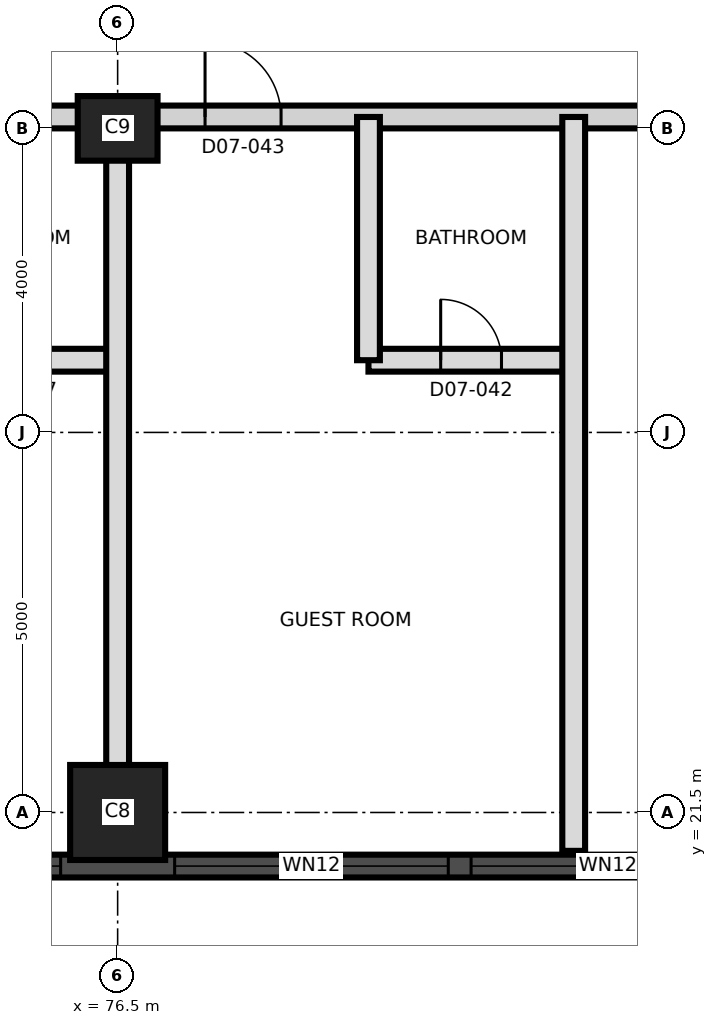
"""IFC4 building model, lengths in metres.
Left out: names, types, materials, properties, quantities, classifications, styles, units other than length and angle.
Written with IfcOpenShell. Run it as: python <this file> out.ifc"""

import sys

from ifc_helpers import new_model, si_unit, direction, frame, frame_2d, origin, origin_2d, place, context, subcontext, project, spatial, rectangle, extrude, element, fill, save


model = new_model("IFC4")
c1 = context("Model", 3, precision=1e-05, world=origin(), true_north=direction((0.0, 1.0)))
c2 = subcontext(c1, "Body", "Model", "MODEL_VIEW")
j1 = project(units=[si_unit("LENGTHUNIT", "METRE"), si_unit("PLANEANGLEUNIT", "RADIAN")], contexts=[c1])
p1 = place(None, origin())
s1 = spatial("IfcSite", under=j1, at=p1, CompositionType="ELEMENT")
p2 = place(p1, origin())
s2 = spatial("IfcBuilding", under=s1, at=p2, CompositionType="ELEMENT")
p3 = place(p2, frame((0.0, 0.0, 90.8)))
s3 = spatial("IfcBuildingStorey", under=s2, at=p3, CompositionType="ELEMENT", Elevation=90.8)
p4 = place(p3, frame((76.5, 21.5, 0.0), z_axis=(0.0, 0.0, 1.0), x_axis=(1.0, 0.0, 0.0)))
e1 = element("IfcColumn", 1, at=p4, inside=s3, PredefinedType="COLUMN", context=c2, shape_type="SweptSolid", body=[
    extrude(rectangle(XDim=1.25, YDim=1.25, at=origin_2d()), origin(), (0.0, 0.0, 1.0), 3.7),
])
p5 = place(p3, frame((76.5, 30.5, 0.0), z_axis=(0.0, 0.0, 1.0), x_axis=(1.0, 0.0, 0.0)))
e2 = element("IfcColumn", 2, at=p5, inside=s3, PredefinedType="COLUMN", context=c2, shape_type="SweptSolid", body=[
    extrude(rectangle(XDim=1.05, YDim=0.85, at=origin_2d()), origin(), (0.0, 0.0, 1.0), 3.7),
])
p6 = place(p3, frame((44.011, 20.795, 0.0), z_axis=(0.0, 0.0, 1.0), x_axis=(1.0, 0.0, 0.0)))
e3 = element("IfcWall", 3, at=p6, inside=s3, PredefinedType="SOLIDWALL", context=c2, shape_type="SweptSolid", body=[
    extrude(rectangle(XDim=43.476, YDim=0.3, at=frame_2d((21.738, 0.0))), origin(), (0.0, 0.0, 1.0), 3.4),
])
p7 = place(p6, frame((1.845, 0.0, 0.3)))
e4 = element("IfcOpeningElement", 4, at=p7, cuts=e3, PredefinedType="OPENING", context=c2, shape_type="SweptSolid", body=[
    extrude(rectangle(XDim=1.8, YDim=2.4, at=frame_2d((0.9, 1.2))), frame((0.0, 0.16, 0.0), z_axis=(0.0, -1.0, 0.0), x_axis=(1.0, 0.0, 0.0)), (0.0, 0.0, 1.0), 0.32),
])
p8 = place(p6, frame((5.639, 0.0, 0.9)))
e5 = element("IfcOpeningElement", 5, at=p8, cuts=e3, PredefinedType="OPENING", context=c2, shape_type="SweptSolid", body=[
    extrude(rectangle(XDim=4.2, YDim=1.5, at=frame_2d((2.1, 0.75))), frame((0.0, 0.16, 0.0), z_axis=(0.0, -1.0, 0.0), x_axis=(1.0, 0.0, 0.0)), (0.0, 0.0, 1.0), 0.32),
])
p9 = place(p6, frame((10.139, 0.0, 0.9)))
e6 = element("IfcOpeningElement", 6, at=p9, cuts=e3, PredefinedType="OPENING", context=c2, shape_type="SweptSolid", body=[
    extrude(rectangle(XDim=4.2, YDim=1.5, at=frame_2d((2.1, 0.75))), frame((0.0, 0.16, 0.0), z_axis=(0.0, -1.0, 0.0), x_axis=(1.0, 0.0, 0.0)), (0.0, 0.0, 1.0), 0.32),
])
p10 = place(p6, frame((14.639, 0.0, 0.9)))
e7 = element("IfcOpeningElement", 7, at=p10, cuts=e3, PredefinedType="OPENING", context=c2, shape_type="SweptSolid", body=[
    extrude(rectangle(XDim=4.2, YDim=1.5, at=frame_2d((2.1, 0.75))), frame((0.0, 0.16, 0.0), z_axis=(0.0, -1.0, 0.0), x_axis=(1.0, 0.0, 0.0)), (0.0, 0.0, 1.0), 0.32),
])
p11 = place(p6, frame((19.139, 0.0, 0.9)))
e8 = element("IfcOpeningElement", 8, at=p11, cuts=e3, PredefinedType="OPENING", context=c2, shape_type="SweptSolid", body=[
    extrude(rectangle(XDim=3.6, YDim=1.5, at=frame_2d((1.8, 0.75))), frame((0.0, 0.16, 0.0), z_axis=(0.0, -1.0, 0.0), x_axis=(1.0, 0.0, 0.0)), (0.0, 0.0, 1.0), 0.32),
])
p12 = place(p6, frame((24.239, 0.0, 0.9)))
e9 = element("IfcOpeningElement", 9, at=p12, cuts=e3, PredefinedType="OPENING", context=c2, shape_type="SweptSolid", body=[
    extrude(rectangle(XDim=3.6, YDim=1.5, at=frame_2d((1.8, 0.75))), frame((0.0, 0.16, 0.0), z_axis=(0.0, -1.0, 0.0), x_axis=(1.0, 0.0, 0.0)), (0.0, 0.0, 1.0), 0.32),
])
p13 = place(p6, frame((28.139, 0.0, 0.9)))
e10 = element("IfcOpeningElement", 10, at=p13, cuts=e3, PredefinedType="OPENING", context=c2, shape_type="SweptSolid", body=[
    extrude(rectangle(XDim=3.6, YDim=1.5, at=frame_2d((1.8, 0.75))), frame((0.0, 0.16, 0.0), z_axis=(0.0, -1.0, 0.0), x_axis=(1.0, 0.0, 0.0)), (0.0, 0.0, 1.0), 0.32),
])
p14 = place(p6, frame((33.239, 0.0, 0.9)))
e11 = element("IfcOpeningElement", 11, at=p14, cuts=e3, PredefinedType="OPENING", context=c2, shape_type="SweptSolid", body=[
    extrude(rectangle(XDim=3.6, YDim=1.5, at=frame_2d((1.8, 0.75))), frame((0.0, 0.16, 0.0), z_axis=(0.0, -1.0, 0.0), x_axis=(1.0, 0.0, 0.0)), (0.0, 0.0, 1.0), 0.32),
])
p15 = place(p6, frame((37.139, 0.0, 0.9)))
e12 = element("IfcOpeningElement", 12, at=p15, cuts=e3, PredefinedType="OPENING", context=c2, shape_type="SweptSolid", body=[
    extrude(rectangle(XDim=3.6, YDim=1.5, at=frame_2d((1.8, 0.75))), frame((0.0, 0.16, 0.0), z_axis=(0.0, -1.0, 0.0), x_axis=(1.0, 0.0, 0.0)), (0.0, 0.0, 1.0), 0.32),
])
p16 = place(p3, frame((73.8, 27.45, 0.0), z_axis=(0.0, 0.0, 1.0), x_axis=(1.0, 0.0, 0.0)))
e13 = element("IfcWall", 13, at=p16, inside=s3, PredefinedType="PARTITIONING", context=c2, shape_type="SweptSolid", body=[
    extrude(rectangle(XDim=2.7, YDim=0.3, at=frame_2d((1.35, 0.0))), origin(), (0.0, 0.0, 1.0), 3.4),
])
p17 = place(p16, frame((0.95, 0.0, 0.0)))
e14 = element("IfcOpeningElement", 14, at=p17, cuts=e13, PredefinedType="OPENING", context=c2, shape_type="SweptSolid", body=[
    extrude(rectangle(XDim=0.8, YDim=2.1, at=frame_2d((0.4, 1.05))), frame((0.0, 0.16, 0.0), z_axis=(0.0, -1.0, 0.0), x_axis=(1.0, 0.0, 0.0)), (0.0, 0.0, 1.0), 0.32),
])
p18 = place(p3, frame((79.8, 27.45, 0.0), z_axis=(0.0, 0.0, 1.0), x_axis=(1.0, 0.0, 0.0)))
e15 = element("IfcWall", 15, at=p18, inside=s3, PredefinedType="PARTITIONING", context=c2, shape_type="SweptSolid", body=[
    extrude(rectangle(XDim=2.7, YDim=0.3, at=frame_2d((1.35, 0.0))), origin(), (0.0, 0.0, 1.0), 3.4),
])
p19 = place(p18, frame((0.95, 0.0, 0.0)))
e16 = element("IfcOpeningElement", 16, at=p19, cuts=e15, PredefinedType="OPENING", context=c2, shape_type="SweptSolid", body=[
    extrude(rectangle(XDim=0.8, YDim=2.1, at=frame_2d((0.4, 1.05))), frame((0.0, 0.16, 0.0), z_axis=(0.0, -1.0, 0.0), x_axis=(1.0, 0.0, 0.0)), (0.0, 0.0, 1.0), 0.32),
])
p20 = place(p3, frame((58.8, 30.65, 0.0), z_axis=(0.0, 0.0, 1.0), x_axis=(1.0, 0.0, 0.0)))
e17 = element("IfcWall", 17, at=p20, inside=s3, PredefinedType="PARTITIONING", context=c2, shape_type="SweptSolid", body=[
    extrude(rectangle(XDim=26.53, YDim=0.3, at=frame_2d((13.265, 0.0))), origin(), (0.0, 0.0, 1.0), 3.4),
])
p21 = place(p20, frame((3.7, 0.0, 0.0)))
e18 = element("IfcOpeningElement", 18, at=p21, cuts=e17, PredefinedType="OPENING", context=c2, shape_type="SweptSolid", body=[
    extrude(rectangle(XDim=1.0, YDim=2.4, at=frame_2d((0.5, 1.2))), frame((0.0, 0.16, 0.0), z_axis=(0.0, -1.0, 0.0), x_axis=(1.0, 0.0, 0.0)), (0.0, 0.0, 1.0), 0.32),
])
p22 = place(p20, frame((11.8, 0.0, 0.0)))
e19 = element("IfcOpeningElement", 19, at=p22, cuts=e17, PredefinedType="OPENING", context=c2, shape_type="SweptSolid", body=[
    extrude(rectangle(XDim=1.0, YDim=2.1, at=frame_2d((0.5, 1.05))), frame((0.0, 0.16, 0.0), z_axis=(0.0, -1.0, 0.0), x_axis=(1.0, 0.0, 0.0)), (0.0, 0.0, 1.0), 0.32),
])
p23 = place(p20, frame((13.6, 0.0, 0.0)))
e20 = element("IfcOpeningElement", 20, at=p23, cuts=e17, PredefinedType="OPENING", context=c2, shape_type="SweptSolid", body=[
    extrude(rectangle(XDim=1.0, YDim=2.1, at=frame_2d((0.5, 1.05))), frame((0.0, 0.16, 0.0), z_axis=(0.0, -1.0, 0.0), x_axis=(1.0, 0.0, 0.0)), (0.0, 0.0, 1.0), 0.32),
])
p24 = place(p20, frame((18.85, 0.0, 0.0)))
e21 = element("IfcOpeningElement", 21, at=p24, cuts=e17, PredefinedType="OPENING", context=c2, shape_type="SweptSolid", body=[
    extrude(rectangle(XDim=1.0, YDim=2.1, at=frame_2d((0.5, 1.05))), frame((0.0, 0.16, 0.0), z_axis=(0.0, -1.0, 0.0), x_axis=(1.0, 0.0, 0.0)), (0.0, 0.0, 1.0), 0.32),
])
p25 = place(p20, frame((24.7, 0.0, 0.0)))
e22 = element("IfcOpeningElement", 22, at=p25, cuts=e17, PredefinedType="OPENING", context=c2, shape_type="SweptSolid", body=[
    extrude(rectangle(XDim=1.0, YDim=2.1, at=frame_2d((0.5, 1.05))), frame((0.0, 0.16, 0.0), z_axis=(0.0, -1.0, 0.0), x_axis=(1.0, 0.0, 0.0)), (0.0, 0.0, 1.0), 0.32),
])
p26 = place(p3, frame((76.5, 20.995, 0.0), z_axis=(0.0, 0.0, 1.0), x_axis=(0.0, 1.0, 0.0)))
e23 = element("IfcWall", 23, at=p26, inside=s3, PredefinedType="PARTITIONING", context=c2, shape_type="SweptSolid", body=[
    extrude(rectangle(XDim=9.655, YDim=0.3, at=frame_2d((4.827, 0.0))), origin(), (0.0, 0.0, 1.0), 3.4),
])
p27 = place(p3, frame((79.8, 27.45, 0.0), z_axis=(0.0, 0.0, 1.0), x_axis=(0.0, 1.0, 0.0)))
e24 = element("IfcWall", 24, at=p27, inside=s3, PredefinedType="PARTITIONING", context=c2, shape_type="SweptSolid", body=[
    extrude(rectangle(XDim=3.2, YDim=0.3, at=frame_2d((1.6, 0.0))), origin(), (0.0, 0.0, 1.0), 3.4),
])
p28 = place(p3, frame((82.5, 20.995, 0.0), z_axis=(0.0, 0.0, 1.0), x_axis=(0.0, 1.0, 0.0)))
e25 = element("IfcWall", 25, at=p28, inside=s3, PredefinedType="PARTITIONING", context=c2, shape_type="SweptSolid", body=[
    extrude(rectangle(XDim=9.655, YDim=0.3, at=frame_2d((4.827, 0.0))), origin(), (0.0, 0.0, 1.0), 3.4),
])
p29 = place(p13, origin())
e26 = element("IfcWindow", 26, at=p29, inside=s3, PartitioningType="SINGLE_PANEL", PredefinedType="WINDOW", context=c2, shape_type="SweptSolid", body=[
    extrude(rectangle(XDim=3.6, YDim=1.5, at=frame_2d((1.8, 0.75))), frame((0.0, 0.03, 0.0), z_axis=(0.0, -1.0, 0.0), x_axis=(1.0, 0.0, 0.0)), (0.0, 0.0, 1.0), 0.06),
])
fill(e10, e26)
p30 = place(p14, origin())
e27 = element("IfcWindow", 27, at=p30, inside=s3, PartitioningType="SINGLE_PANEL", PredefinedType="WINDOW", context=c2, shape_type="SweptSolid", body=[
    extrude(rectangle(XDim=3.6, YDim=1.5, at=frame_2d((1.8, 0.75))), frame((0.0, 0.03, 0.0), z_axis=(0.0, -1.0, 0.0), x_axis=(1.0, 0.0, 0.0)), (0.0, 0.0, 1.0), 0.06),
])
fill(e11, e27)
p31 = place(p15, origin())
e28 = element("IfcWindow", 28, at=p31, inside=s3, PartitioningType="SINGLE_PANEL", PredefinedType="WINDOW", context=c2, shape_type="SweptSolid", body=[
    extrude(rectangle(XDim=3.6, YDim=1.5, at=frame_2d((1.8, 0.75))), frame((0.0, 0.03, 0.0), z_axis=(0.0, -1.0, 0.0), x_axis=(1.0, 0.0, 0.0)), (0.0, 0.0, 1.0), 0.06),
])
fill(e12, e28)
p32 = place(p19, origin())
e29 = element("IfcDoor", 29, at=p32, inside=s3, OperationType="SINGLE_SWING_RIGHT", PredefinedType="DOOR", context=c2, shape_type="SweptSolid", body=[
    extrude(rectangle(XDim=0.8, YDim=2.1, at=frame_2d((0.4, 1.05))), frame((0.0, 0.025, 0.0), z_axis=(0.0, -1.0, 0.0), x_axis=(1.0, 0.0, 0.0)), (0.0, 0.0, 1.0), 0.05),
])
fill(e16, e29)
p33 = place(p24, origin())
e30 = element("IfcDoor", 30, at=p33, inside=s3, OperationType="SINGLE_SWING_LEFT", PredefinedType="DOOR", context=c2, shape_type="SweptSolid", body=[
    extrude(rectangle(XDim=1.0, YDim=2.1, at=frame_2d((0.5, 1.05))), frame((0.0, 0.025, 0.0), z_axis=(0.0, -1.0, 0.0), x_axis=(1.0, 0.0, 0.0)), (0.0, 0.0, 1.0), 0.05),
])
fill(e21, e30)
save(model, sys.argv[1])
